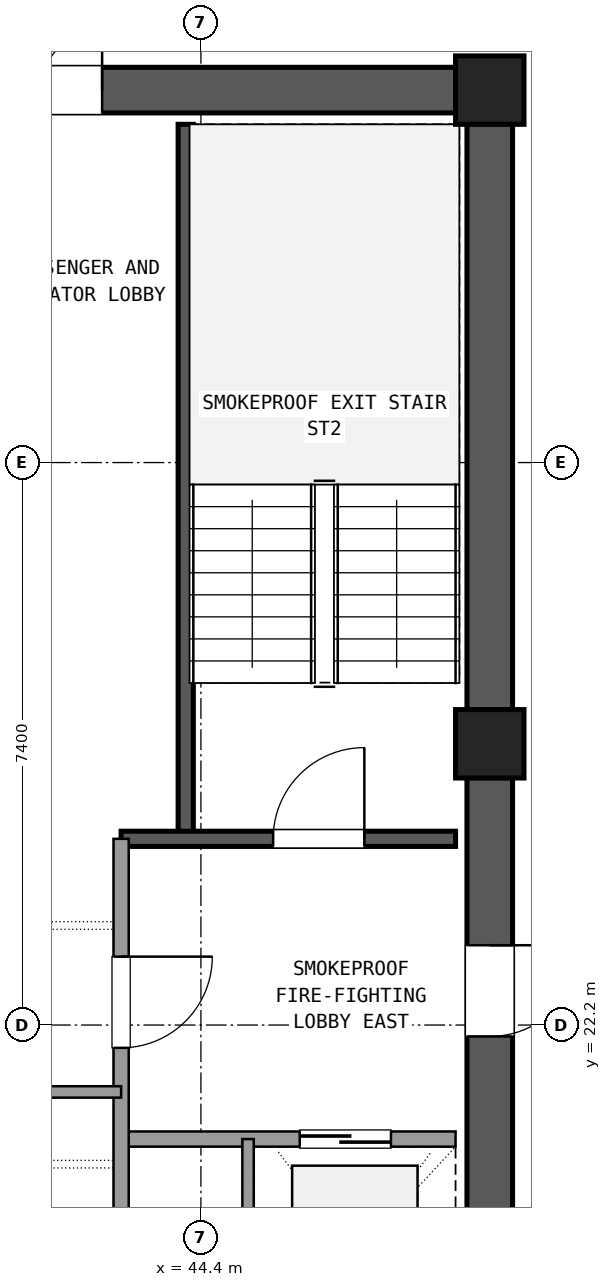
"""IFC4 building model, lengths in metres.
Left out: names, types, materials, properties, quantities, classifications, styles, units other than length and angle.
Written with IfcOpenShell. Run it as: python <this file> out.ifc"""

import sys

from ifc_helpers import new_model, si_unit, direction, frame, frame_2d, origin, origin_2d, place, context, subcontext, project, spatial, rectangle, extrude, element, fill, save


model = new_model("IFC4")
c1 = context("Model", 3, precision=1e-05, world=origin(), true_north=direction((0.0, 1.0)))
c2 = subcontext(c1, "Body", "Model", "MODEL_VIEW")
j1 = project(units=[si_unit("LENGTHUNIT", "METRE"), si_unit("PLANEANGLEUNIT", "RADIAN")], contexts=[c1])
p1 = place(None, origin())
s1 = spatial("IfcSite", under=j1, at=p1, CompositionType="ELEMENT")
p2 = place(p1, origin())
s2 = spatial("IfcBuilding", under=s1, at=p2, CompositionType="ELEMENT")
p3 = place(p2, frame((0.0, 0.0, 203.58)))
s3 = spatial("IfcBuildingStorey", under=s2, at=p3, CompositionType="ELEMENT", Elevation=203.58)
for number, where, z_axis, x_axis in (
    (1, (48.2, 25.9, 0.0), (0.0, 0.0, 1.0), (1.0, 0.0, 0.0)),
    (2, (48.2, 34.5, 0.0), (0.0, 0.0, 1.0), (1.0, 0.0, 0.0)),
):
    element("IfcColumn", number, at=place(p3, frame(where, z_axis=z_axis, x_axis=x_axis)), inside=s3, PredefinedType="COLUMN", context=c2, shape_type="SweptSolid", body=[
        extrude(rectangle(XDim=0.9, YDim=0.9, at=origin_2d()), origin(), (0.0, 0.0, 1.0), 3.6),
    ])
p4 = place(p3, frame((48.2, 17.745, 0.0), z_axis=(0.0, 0.0, 1.0), x_axis=(0.0, 1.0, 0.0)))
e3 = element("IfcWall", 3, at=p4, inside=s3, PredefinedType="SHEAR", context=c2, shape_type="SweptSolid", body=[
    extrude(rectangle(XDim=7.71, YDim=0.6, at=frame_2d((3.855, 0.0))), origin(), (0.0, 0.0, 1.0), 3.32),
])
p5 = place(p4, frame((4.305, 0.0, 0.0)))
e4 = element("IfcOpeningElement", 4, at=p5, cuts=e3, PredefinedType="OPENING", context=c2, shape_type="SweptSolid", body=[
    extrude(rectangle(XDim=1.2, YDim=2.15, at=frame_2d((0.6, 1.075))), frame((0.0, 0.31, 0.0), z_axis=(0.0, -1.0, 0.0), x_axis=(1.0, 0.0, 0.0)), (0.0, 0.0, 1.0), 0.62),
])
p6 = place(p3, frame((48.2, 26.345, 0.0), z_axis=(0.0, 0.0, 1.0), x_axis=(0.0, 1.0, 0.0)))
e5 = element("IfcWall", 5, at=p6, inside=s3, PredefinedType="SHEAR", context=c2, shape_type="SweptSolid", body=[
    extrude(rectangle(XDim=7.71, YDim=0.6, at=frame_2d((3.855, 0.0))), origin(), (0.0, 0.0, 1.0), 3.32),
])
p7 = place(p3, frame((47.755, 34.5, 0.0), z_axis=(0.0, 0.0, 1.0), x_axis=(-1.0, 0.0, 0.0)))
e6 = element("IfcWall", 6, at=p7, inside=s3, PredefinedType="SHEAR", context=c2, shape_type="SweptSolid", body=[
    extrude(rectangle(XDim=10.31, YDim=0.6, at=frame_2d((5.155, 0.0))), origin(), (0.0, 0.0, 1.0), 3.32),
])
p8 = place(p7, frame((4.655, 0.0, 0.0)))
e7 = element("IfcOpeningElement", 7, at=p8, cuts=e6, PredefinedType="OPENING", context=c2, shape_type="SweptSolid", body=[
    extrude(rectangle(XDim=1.6, YDim=2.2, at=frame_2d((0.8, 1.1))), frame((0.0, 0.31, 0.0), z_axis=(0.0, -1.0, 0.0), x_axis=(1.0, 0.0, 0.0)), (0.0, 0.0, 1.0), 0.62),
])
p9 = place(p3, frame((44.2, 24.65, 0.0), z_axis=(0.0, 0.0, 1.0), x_axis=(0.0, 1.0, 0.0)))
e8 = element("IfcWall", 8, at=p9, inside=s3, PredefinedType="SHEAR", context=c2, shape_type="SweptSolid", body=[
    extrude(rectangle(XDim=9.4, YDim=0.2, at=frame_2d((4.7, 0.0))), origin(), (0.0, 0.0, 1.0), 3.32),
])
p10 = place(p3, frame((43.35, 24.65, 0.0), z_axis=(0.0, 0.0, 1.0), x_axis=(1.0, 0.0, 0.0)))
e9 = element("IfcWall", 9, at=p10, inside=s3, PredefinedType="SHEAR", context=c2, shape_type="SweptSolid", body=[
    extrude(rectangle(XDim=4.4, YDim=0.2, at=frame_2d((2.2, 0.0))), origin(), (0.0, 0.0, 1.0), 3.32),
])
p11 = place(p10, frame((2.0, 0.0, 0.0)))
e10 = element("IfcOpeningElement", 10, at=p11, cuts=e9, PredefinedType="OPENING", context=c2, shape_type="SweptSolid", body=[
    extrude(rectangle(XDim=1.2, YDim=2.15, at=frame_2d((0.6, 1.075))), frame((0.0, 0.11, 0.0), z_axis=(0.0, -1.0, 0.0), x_axis=(1.0, 0.0, 0.0)), (0.0, 0.0, 1.0), 0.22),
])
p12 = place(p3, frame((43.35, 20.7, 0.0), z_axis=(0.0, 0.0, 1.0), x_axis=(1.0, 0.0, 0.0)))
e11 = element("IfcWall", 11, at=p12, inside=s3, PredefinedType="SOLIDWALL", context=c2, shape_type="SweptSolid", body=[
    extrude(rectangle(XDim=4.4, YDim=0.2, at=frame_2d((2.2, 0.0))), origin(), (0.0, 0.0, 1.0), 2.61),
])
p13 = place(p12, frame((2.35, 0.0, 0.0)))
e12 = element("IfcOpeningElement", 12, at=p13, cuts=e11, PredefinedType="OPENING", context=c2, shape_type="SweptSolid", body=[
    extrude(rectangle(XDim=1.2, YDim=2.15, at=frame_2d((0.6, 1.075))), frame((0.0, 0.11, 0.0), z_axis=(0.0, -1.0, 0.0), x_axis=(1.0, 0.0, 0.0)), (0.0, 0.0, 1.0), 0.22),
])
p14 = place(p3, frame((43.35, 17.75, 0.0), z_axis=(0.0, 0.0, 1.0), x_axis=(0.0, 1.0, 0.0)))
e13 = element("IfcWall", 13, at=p14, inside=s3, PredefinedType="SOLIDWALL", context=c2, shape_type="SweptSolid", body=[
    extrude(rectangle(XDim=6.9, YDim=0.2, at=frame_2d((3.45, 0.0))), origin(), (0.0, 0.0, 1.0), 2.61),
])
p15 = place(p14, frame((4.15, 0.0, 0.0)))
e14 = element("IfcOpeningElement", 14, at=p15, cuts=e13, PredefinedType="OPENING", context=c2, shape_type="SweptSolid", body=[
    extrude(rectangle(XDim=1.2, YDim=2.15, at=frame_2d((0.6, 1.075))), frame((0.0, 0.11, 0.0), z_axis=(0.0, -1.0, 0.0), x_axis=(1.0, 0.0, 0.0)), (0.0, 0.0, 1.0), 0.22),
])
p16 = place(p3, frame((45.02, 17.75, 0.0), z_axis=(0.0, 0.0, 1.0), x_axis=(0.0, 1.0, 0.0)))
e15 = element("IfcWall", 15, at=p16, inside=s3, PredefinedType="PARTITIONING", context=c2, shape_type="SweptSolid", body=[
    extrude(rectangle(XDim=2.95, YDim=0.15, at=frame_2d((1.475, 0.0))), origin(), (0.0, 0.0, 1.0), 2.61),
])
p17 = place(p3, frame((37.25, 21.32, 0.0), z_axis=(0.0, 0.0, 1.0), x_axis=(1.0, 0.0, 0.0)))
e16 = element("IfcWall", 16, at=p17, inside=s3, PredefinedType="PARTITIONING", context=c2, shape_type="SweptSolid", body=[
    extrude(rectangle(XDim=6.1, YDim=0.15, at=frame_2d((3.05, 0.0))), origin(), (0.0, 0.0, 1.0), 2.61),
])
p18 = place(p17, frame((0.55, 0.0, 0.0)))
e17 = element("IfcOpeningElement", 17, at=p18, cuts=e16, PredefinedType="OPENING", context=c2, shape_type="SweptSolid", body=[
    extrude(rectangle(XDim=1.0, YDim=2.15, at=frame_2d((0.5, 1.075))), frame((0.0, 0.085, 0.0), z_axis=(0.0, -1.0, 0.0), x_axis=(1.0, 0.0, 0.0)), (0.0, 0.0, 1.0), 0.17),
])
p19 = place(p17, frame((3.5, 0.0, 0.0)))
e18 = element("IfcOpeningElement", 18, at=p19, cuts=e16, PredefinedType="OPENING", context=c2, shape_type="SweptSolid", body=[
    extrude(rectangle(XDim=1.0, YDim=2.15, at=frame_2d((0.5, 1.075))), frame((0.0, 0.085, 0.0), z_axis=(0.0, -1.0, 0.0), x_axis=(1.0, 0.0, 0.0)), (0.0, 0.0, 1.0), 0.17),
])
p20 = place(p11, origin())
e19 = element("IfcDoor", 19, at=p20, inside=s3, OperationType="SINGLE_SWING_RIGHT", PredefinedType="DOOR", context=c2, shape_type="SweptSolid", body=[
    extrude(rectangle(XDim=1.2, YDim=2.15, at=frame_2d((0.6, 1.075))), frame((0.0, 0.025, 0.0), z_axis=(0.0, -1.0, 0.0), x_axis=(1.0, 0.0, 0.0)), (0.0, 0.0, 1.0), 0.05),
])
fill(e10, e19)
p21 = place(p13, origin())
e20 = element("IfcDoor", 20, at=p21, inside=s3, OperationType="SLIDING_TO_RIGHT", PredefinedType="DOOR", context=c2, shape_type="SweptSolid", body=[
    extrude(rectangle(XDim=1.2, YDim=2.15, at=frame_2d((0.6, 1.075))), frame((0.0, 0.025, 0.0), z_axis=(0.0, -1.0, 0.0), x_axis=(1.0, 0.0, 0.0)), (0.0, 0.0, 1.0), 0.05),
])
fill(e12, e20)
p22 = place(p15, frame((1.2, 0.0, 0.0), z_axis=(0.0, 0.0, 1.0), x_axis=(-1.0, 0.0, 0.0)))
e21 = element("IfcDoor", 21, at=p22, inside=s3, OperationType="SINGLE_SWING_RIGHT", PredefinedType="DOOR", context=c2, shape_type="SweptSolid", body=[
    extrude(rectangle(XDim=1.2, YDim=2.15, at=frame_2d((0.6, 1.075))), frame((0.0, 0.025, 0.0), z_axis=(0.0, -1.0, 0.0), x_axis=(1.0, 0.0, 0.0)), (0.0, 0.0, 1.0), 0.05),
])
fill(e14, e21)
p23 = place(p5, frame((1.2, 0.0, 0.0), z_axis=(0.0, 0.0, 1.0), x_axis=(-1.0, 0.0, 0.0)))
e22 = element("IfcDoor", 22, at=p23, inside=s3, OperationType="SINGLE_SWING_RIGHT", PredefinedType="DOOR", context=c2, shape_type="SweptSolid", body=[
    extrude(rectangle(XDim=1.2, YDim=2.15, at=frame_2d((0.6, 1.075))), frame((0.0, 0.025, 0.0), z_axis=(0.0, -1.0, 0.0), x_axis=(1.0, 0.0, 0.0)), (0.0, 0.0, 1.0), 0.05),
])
fill(e4, e22)
p24 = place(p8, frame((1.6, 0.0, 0.0), z_axis=(0.0, 0.0, 1.0), x_axis=(-1.0, 0.0, 0.0)))
e23 = element("IfcDoor", 23, at=p24, inside=s3, OperationType="DOUBLE_DOOR_SINGLE_SWING", PredefinedType="DOOR", context=c2, shape_type="SweptSolid", body=[
    extrude(rectangle(XDim=1.6, YDim=2.2, at=frame_2d((0.8, 1.1))), frame((0.0, 0.025, 0.0), z_axis=(0.0, -1.0, 0.0), x_axis=(1.0, 0.0, 0.0)), (0.0, 0.0, 1.0), 0.05),
])
fill(e7, e23)
save(model, sys.argv[1])
